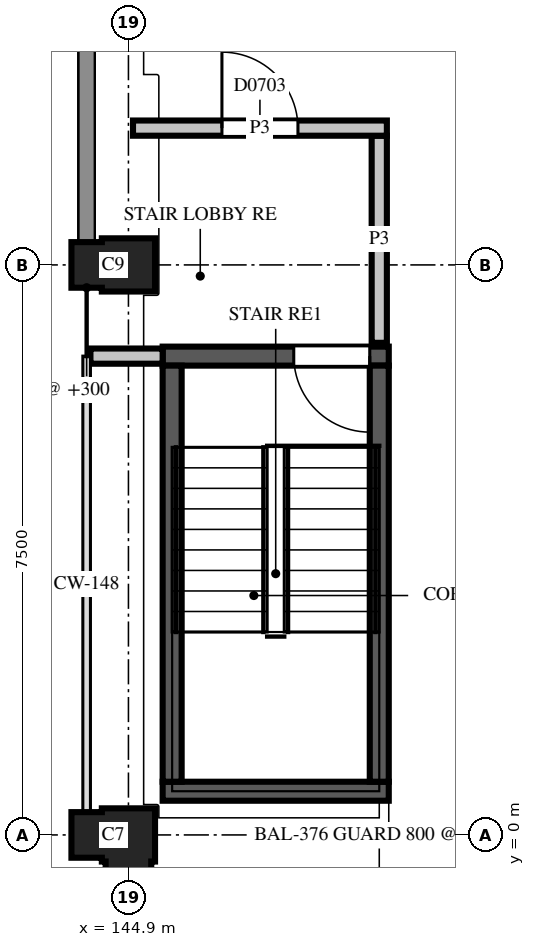
"""IFC4 building model, lengths in metres.
Left out: names, types, materials, properties, quantities, classifications, styles, units other than length and angle.
Written with IfcOpenShell. Run it as: python <this file> out.ifc"""

import sys

from ifc_helpers import new_model, si_unit, direction, frame, frame_2d, origin, place, context, subcontext, project, spatial, polyline, rectangle, outline, extrude, element, fill, save


model = new_model("IFC4")
c1 = context("Model", 3, precision=1e-05, world=origin(), true_north=direction((0.0, 1.0)))
c2 = subcontext(c1, "Body", "Model", "MODEL_VIEW")
j1 = project(units=[si_unit("LENGTHUNIT", "METRE"), si_unit("PLANEANGLEUNIT", "RADIAN")], contexts=[c1])
p1 = place(None, origin())
s1 = spatial("IfcSite", under=j1, at=p1, CompositionType="ELEMENT")
p2 = place(p1, origin())
s2 = spatial("IfcBuilding", under=s1, at=p2, CompositionType="ELEMENT")
p3 = place(p2, frame((0.0, 0.0, 26.7)))
s3 = spatial("IfcBuildingStorey", under=s2, at=p3, CompositionType="ELEMENT", Elevation=26.7)
p4 = place(p3, frame((144.9, 0.0, 0.0), z_axis=(0.0, 0.0, 1.0), x_axis=(-1.0, 0.0, 0.0)))
e1 = element("IfcColumn", 1, at=p4, inside=s3, PredefinedType="COLUMN", context=c2, shape_type="SweptSolid", body=[
    extrude(outline(polyline([(-0.35, -0.35), (0.35, -0.35), (0.35, -0.3), (0.75, -0.3), (0.75, 0.3), (0.35, 0.3), (0.35, 0.35), (0.3, 0.35), (0.3, 0.75), (-0.3, 0.75), (-0.3, 0.35), (-0.35, 0.35), (-0.35, -0.35)])), origin(), (0.0, 0.0, 1.0), 3.7),
])
p5 = place(p3, frame((144.9, 7.5, 0.0), z_axis=(0.0, 0.0, 1.0), x_axis=(-1.0, 0.0, 0.0)))
e2 = element("IfcColumn", 2, at=p5, inside=s3, PredefinedType="COLUMN", context=c2, shape_type="SweptSolid", body=[
    extrude(outline(polyline([(-0.35, -0.35), (0.35, -0.35), (0.35, -0.3), (0.75, -0.3), (0.75, 0.3), (0.35, 0.3), (0.35, 0.35), (-0.35, 0.35), (-0.35, -0.35)])), origin(), (0.0, 0.0, 1.0), 3.7),
])
p6 = place(p3, frame((145.35, 0.575, 0.0), z_axis=(0.0, 0.0, 1.0), x_axis=(1.0, 0.0, 0.0)))
e3 = element("IfcWall", 3, at=p6, inside=s3, PredefinedType="SHEAR", context=c2, shape_type="SweptSolid", body=[
    extrude(rectangle(XDim=2.975, YDim=0.25, at=frame_2d((1.487, 0.0))), origin(), (0.0, 0.0, 1.0), 3.7),
])
p7 = place(p3, frame((145.35, 6.3, 0.0), z_axis=(0.0, 0.0, 1.0), x_axis=(1.0, 0.0, 0.0)))
e4 = element("IfcWall", 4, at=p7, inside=s3, PredefinedType="SHEAR", context=c2, shape_type="SweptSolid", body=[
    extrude(rectangle(XDim=2.975, YDim=0.25, at=frame_2d((1.487, 0.0))), origin(), (0.0, 0.0, 1.0), 3.7),
])
p8 = place(p7, frame((1.725, 0.0, 0.0)))
e5 = element("IfcOpeningElement", 5, at=p8, cuts=e4, PredefinedType="OPENING", context=c2, shape_type="SweptSolid", body=[
    extrude(rectangle(XDim=1.0, YDim=2.1, at=frame_2d((0.5, 1.05))), frame((0.0, 0.135, 0.0), z_axis=(0.0, -1.0, 0.0), x_axis=(1.0, 0.0, 0.0)), (0.0, 0.0, 1.0), 0.27),
])
for number, where, z_axis, x_axis in (
    (6, (145.475, 0.7, 0.0), (0.0, 0.0, 1.0), (0.0, 1.0, 0.0)),
    (7, (148.2, 0.7, 0.0), (0.0, 0.0, 1.0), (0.0, 1.0, 0.0)),
):
    element("IfcWall", number, at=place(p3, frame(where, z_axis=z_axis, x_axis=x_axis)), inside=s3, PredefinedType="SHEAR", context=c2, shape_type="SweptSolid", body=[
        extrude(rectangle(XDim=5.475, YDim=0.25, at=frame_2d((2.738, 0.0))), origin(), (0.0, 0.0, 1.0), 3.7),
    ])
p9 = place(p3, frame((144.4, 6.3, 0.0), z_axis=(0.0, 0.0, 1.0), x_axis=(1.0, 0.0, 0.0)))
e8 = element("IfcWall", 8, at=p9, inside=s3, PredefinedType="PARTITIONING", context=c2, shape_type="SweptSolid", body=[
    extrude(rectangle(XDim=0.95, YDim=0.2, at=frame_2d((0.475, 0.0))), origin(), (0.0, 0.0, 1.0), 2.88),
])
p10 = place(p3, frame((148.2, 6.475, 0.0), z_axis=(0.0, 0.0, 1.0), x_axis=(0.0, 1.0, 0.0)))
e9 = element("IfcWall", 9, at=p10, inside=s3, PredefinedType="PARTITIONING", context=c2, shape_type="SweptSolid", body=[
    extrude(rectangle(XDim=2.725, YDim=0.2, at=frame_2d((1.362, 0.0))), origin(), (0.0, 0.0, 1.0), 2.88),
])
p11 = place(p3, frame((148.3, 9.3, 0.0), z_axis=(0.0, 0.0, 1.0), x_axis=(-1.0, 0.0, 0.0)))
e10 = element("IfcWall", 10, at=p11, inside=s3, PredefinedType="PARTITIONING", context=c2, shape_type="SweptSolid", body=[
    extrude(rectangle(XDim=3.34, YDim=0.2, at=frame_2d((1.67, 0.0))), origin(), (0.0, 0.0, 1.0), 2.88),
])
p12 = place(p11, frame((1.17, 0.0, 0.0)))
e11 = element("IfcOpeningElement", 11, at=p12, cuts=e10, PredefinedType="OPENING", context=c2, shape_type="SweptSolid", body=[
    extrude(rectangle(XDim=1.0, YDim=2.1, at=frame_2d((0.5, 1.05))), frame((0.0, 0.11, 0.0), z_axis=(0.0, -1.0, 0.0), x_axis=(1.0, 0.0, 0.0)), (0.0, 0.0, 1.0), 0.22),
])
p13 = place(p12, origin())
e12 = element("IfcDoor", 12, at=p13, inside=s3, OperationType="SINGLE_SWING_RIGHT", PredefinedType="DOOR", context=c2, shape_type="SweptSolid", body=[
    extrude(rectangle(XDim=1.0, YDim=2.1, at=frame_2d((0.5, 1.05))), frame((0.0, 0.025, 0.0), z_axis=(0.0, -1.0, 0.0), x_axis=(1.0, 0.0, 0.0)), (0.0, 0.0, 1.0), 0.05),
])
fill(e11, e12)
p14 = place(p8, origin())
e13 = element("IfcDoor", 13, at=p14, inside=s3, OperationType="SINGLE_SWING_RIGHT", PredefinedType="DOOR", context=c2, shape_type="SweptSolid", body=[
    extrude(rectangle(XDim=1.0, YDim=2.1, at=frame_2d((0.5, 1.05))), frame((0.0, 0.025, 0.0), z_axis=(0.0, -1.0, 0.0), x_axis=(1.0, 0.0, 0.0)), (0.0, 0.0, 1.0), 0.05),
])
fill(e5, e13)
save(model, sys.argv[1])
